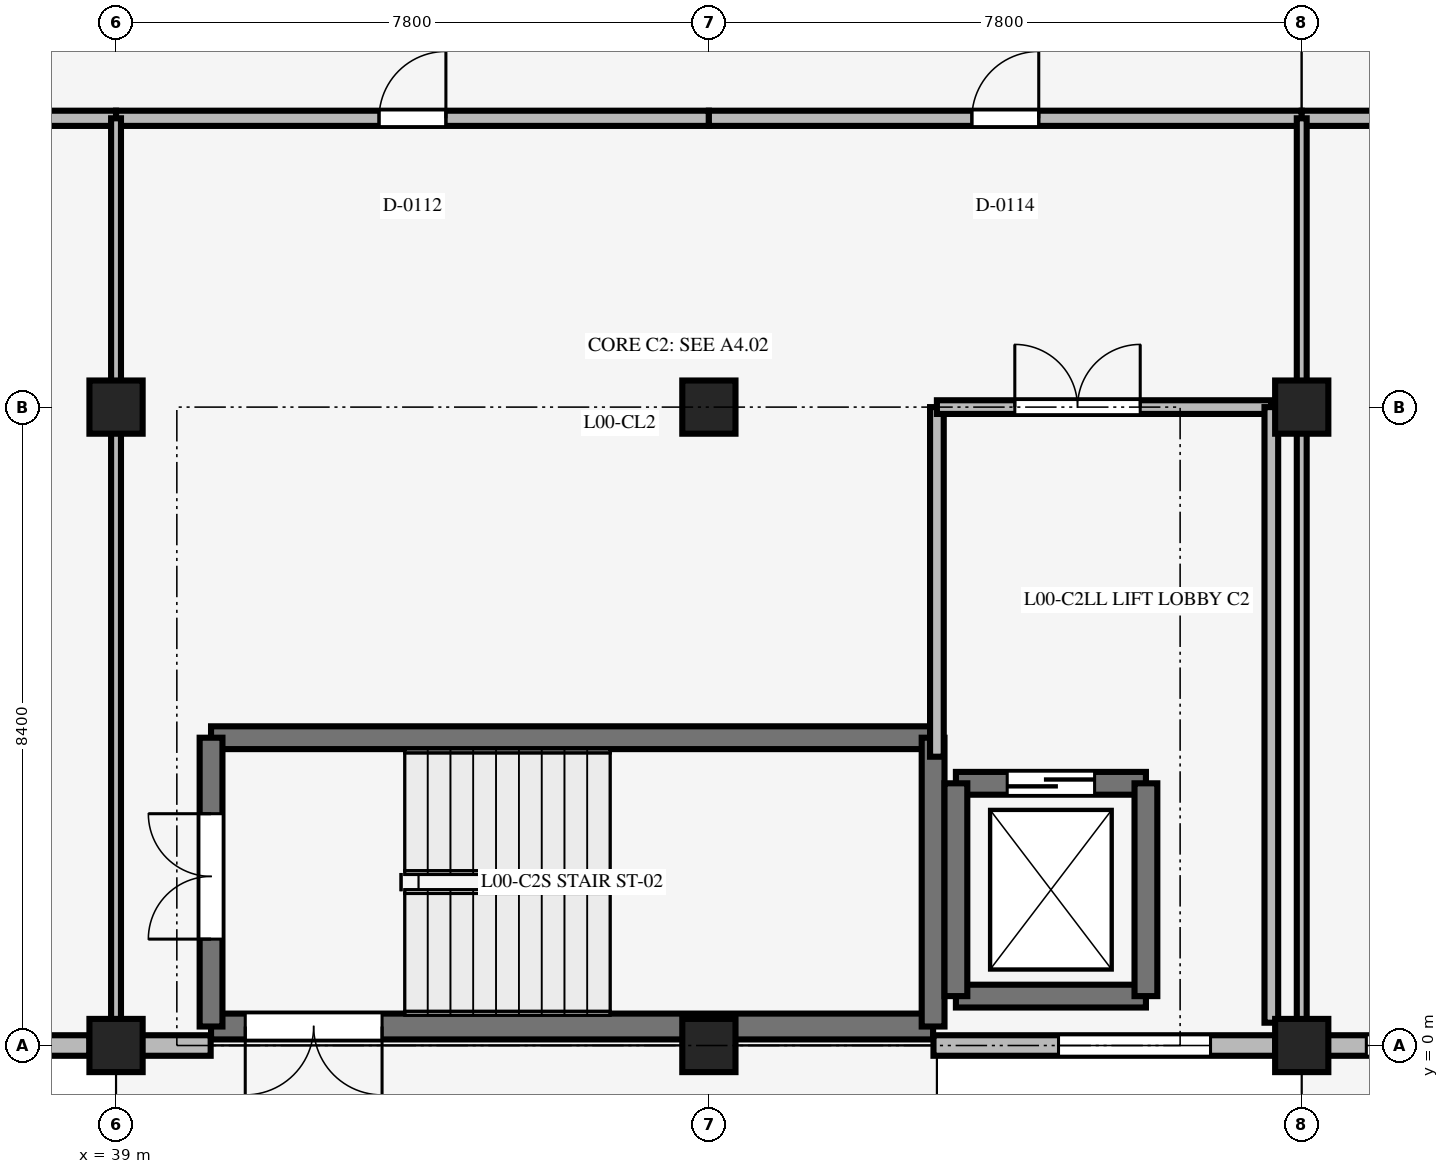
"""IFC4 building model, lengths in metres.
Left out: names, types, materials, properties, quantities, classifications, styles, units other than length and angle.
Written with IfcOpenShell. Run it as: python <this file> out.ifc"""

import sys

from ifc_helpers import new_model, si_unit, direction, frame, frame_2d, origin, origin_2d, place, context, subcontext, project, spatial, rectangle, extrude, element, fill, save


model = new_model("IFC4")
c1 = context("Model", 3, precision=1e-05, world=origin(), true_north=direction((0.0, 1.0)))
c2 = subcontext(c1, "Body", "Model", "MODEL_VIEW")
j1 = project(units=[si_unit("LENGTHUNIT", "METRE"), si_unit("PLANEANGLEUNIT", "RADIAN")], contexts=[c1])
p1 = place(None, origin())
s1 = spatial("IfcSite", under=j1, at=p1, CompositionType="ELEMENT")
p2 = place(p1, origin())
s2 = spatial("IfcBuilding", under=s1, at=p2, CompositionType="ELEMENT")
p3 = place(p2, origin())
s3 = spatial("IfcBuildingStorey", under=s2, at=p3, CompositionType="ELEMENT", Elevation=0.0)
for number, where, z_axis, x_axis in (
    (1, (39.0, 0.0, 0.0), (0.0, 0.0, 1.0), (1.0, 0.0, 0.0)),
    (2, (39.0, 8.4, 0.0), (0.0, 0.0, 1.0), (1.0, 0.0, 0.0)),
    (3, (46.8, 0.0, 0.0), (0.0, 0.0, 1.0), (1.0, 0.0, 0.0)),
    (4, (46.8, 8.4, 0.0), (0.0, 0.0, 1.0), (1.0, 0.0, 0.0)),
    (5, (54.6, 0.0, 0.0), (0.0, 0.0, 1.0), (1.0, 0.0, 0.0)),
    (6, (54.6, 8.4, 0.0), (0.0, 0.0, 1.0), (1.0, 0.0, 0.0)),
):
    element("IfcColumn", number, at=place(p3, frame(where, z_axis=z_axis, x_axis=x_axis)), inside=s3, PredefinedType="COLUMN", context=c2, shape_type="SweptSolid", body=[
        extrude(rectangle(XDim=0.7, YDim=0.7, at=origin_2d()), origin(), (0.0, 0.0, 1.0), 6.0),
    ])
p4 = place(p3, frame((49.75, 0.25, 0.0), z_axis=(0.0, 0.0, 1.0), x_axis=(-1.0, 0.0, 0.0)))
e7 = element("IfcWall", 7, at=p4, inside=s3, PredefinedType="STANDARD", context=c2, shape_type="SweptSolid", body=[
    extrude(rectangle(XDim=9.5, YDim=0.34, at=frame_2d((4.75, 0.0))), origin(), (0.0, 0.0, 1.0), 6.0),
])
p5 = place(p4, frame((7.25, 0.0, 0.0)))
e8 = element("IfcOpeningElement", 8, at=p5, cuts=e7, PredefinedType="OPENING", context=c2, shape_type="SweptSolid", body=[
    extrude(rectangle(XDim=1.8, YDim=2.25, at=frame_2d((0.9, 1.125))), frame((0.0, 0.18, 0.0), z_axis=(0.0, -1.0, 0.0), x_axis=(1.0, 0.0, 0.0)), (0.0, 0.0, 1.0), 0.36),
])
p6 = place(p3, frame((40.25, 4.05, 0.0), z_axis=(0.0, 0.0, 1.0), x_axis=(1.0, 0.0, 0.0)))
e9 = element("IfcWall", 9, at=p6, inside=s3, PredefinedType="SHEAR", context=c2, shape_type="SweptSolid", body=[
    extrude(rectangle(XDim=9.5, YDim=0.3, at=frame_2d((4.75, 0.0))), origin(), (0.0, 0.0, 1.0), 6.0),
])
p7 = place(p3, frame((40.25, 0.25, 0.0), z_axis=(0.0, 0.0, 1.0), x_axis=(0.0, 1.0, 0.0)))
e10 = element("IfcWall", 10, at=p7, inside=s3, PredefinedType="SHEAR", context=c2, shape_type="SweptSolid", body=[
    extrude(rectangle(XDim=3.8, YDim=0.3, at=frame_2d((1.9, 0.0))), origin(), (0.0, 0.0, 1.0), 6.0),
])
p8 = place(p7, frame((1.15, 0.0, 0.0)))
e11 = element("IfcOpeningElement", 11, at=p8, cuts=e10, PredefinedType="OPENING", context=c2, shape_type="SweptSolid", body=[
    extrude(rectangle(XDim=1.65, YDim=2.2, at=frame_2d((0.825, 1.1))), frame((0.0, 0.16, 0.0), z_axis=(0.0, -1.0, 0.0), x_axis=(1.0, 0.0, 0.0)), (0.0, 0.0, 1.0), 0.32),
])
p9 = place(p3, frame((49.75, 0.25, 0.0), z_axis=(0.0, 0.0, 1.0), x_axis=(0.0, 1.0, 0.0)))
e12 = element("IfcWall", 12, at=p9, inside=s3, PredefinedType="SHEAR", context=c2, shape_type="SweptSolid", body=[
    extrude(rectangle(XDim=3.8, YDim=0.3, at=frame_2d((1.9, 0.0))), origin(), (0.0, 0.0, 1.0), 6.0),
])
p10 = place(p3, frame((50.05, 0.65, 0.0), z_axis=(0.0, 0.0, 1.0), x_axis=(1.0, 0.0, 0.0)))
e13 = element("IfcWall", 13, at=p10, inside=s3, PredefinedType="SHEAR", context=c2, shape_type="SweptSolid", body=[
    extrude(rectangle(XDim=2.5, YDim=0.3, at=frame_2d((1.25, 0.0))), origin(), (0.0, 0.0, 1.0), 5.66),
])
p11 = place(p3, frame((50.05, 3.45, 0.0), z_axis=(0.0, 0.0, 1.0), x_axis=(1.0, 0.0, 0.0)))
e14 = element("IfcWall", 14, at=p11, inside=s3, PredefinedType="SHEAR", context=c2, shape_type="SweptSolid", body=[
    extrude(rectangle(XDim=2.5, YDim=0.3, at=frame_2d((1.25, 0.0))), origin(), (0.0, 0.0, 1.0), 5.66),
])
p12 = place(p11, frame((0.675, 0.0, 0.0)))
e15 = element("IfcOpeningElement", 15, at=p12, cuts=e14, PredefinedType="OPENING", context=c2, shape_type="SweptSolid", body=[
    extrude(rectangle(XDim=1.15, YDim=2.2, at=frame_2d((0.575, 1.1))), frame((0.0, 0.16, 0.0), z_axis=(0.0, -1.0, 0.0), x_axis=(1.0, 0.0, 0.0)), (0.0, 0.0, 1.0), 0.32),
])
for number, where, z_axis, x_axis in (
    (16, (50.05, 0.65, 0.0), (0.0, 0.0, 1.0), (0.0, 1.0, 0.0)),
    (17, (52.55, 0.65, 0.0), (0.0, 0.0, 1.0), (0.0, 1.0, 0.0)),
):
    element("IfcWall", number, at=place(p3, frame(where, z_axis=z_axis, x_axis=x_axis)), inside=s3, PredefinedType="SHEAR", context=c2, shape_type="SweptSolid", body=[
        extrude(rectangle(XDim=2.8, YDim=0.3, at=frame_2d((1.4, 0.0))), origin(), (0.0, 0.0, 1.0), 5.66),
    ])
p13 = place(p3, frame((38.65, 0.0, 0.0), z_axis=(0.0, 0.0, 1.0), x_axis=(-1.0, 0.0, 0.0)))
e18 = element("IfcWall", 18, at=p13, inside=s3, PredefinedType="STANDARD", context=c2, shape_type="SweptSolid", body=[
    extrude(rectangle(XDim=7.1, YDim=0.27, at=frame_2d((3.55, 0.0))), origin(), (0.0, 0.0, 1.0), 5.381),
])
p14 = place(p13, frame((0.9, 0.0, 0.9)))
e19 = element("IfcOpeningElement", 19, at=p14, cuts=e18, PredefinedType="OPENING", context=c2, shape_type="SweptSolid", body=[
    extrude(rectangle(XDim=3.2, YDim=2.1, at=frame_2d((1.6, 1.05))), frame((0.0, 0.145, 0.0), z_axis=(0.0, -1.0, 0.0), x_axis=(1.0, 0.0, 0.0)), (0.0, 0.0, 1.0), 0.29),
])
p15 = place(p3, frame((40.245, 0.0, 0.0), z_axis=(0.0, 0.0, 1.0), x_axis=(-1.0, 0.0, 0.0)))
e20 = element("IfcWall", 20, at=p15, inside=s3, PredefinedType="STANDARD", context=c2, shape_type="SweptSolid", body=[
    extrude(rectangle(XDim=0.925, YDim=0.27, at=frame_2d((0.462, 0.0))), origin(), (0.0, 0.0, 1.0), 5.75),
])
p16 = place(p3, frame((54.25, 0.0, 0.0), z_axis=(0.0, 0.0, 1.0), x_axis=(-1.0, 0.0, 0.0)))
e21 = element("IfcWall", 21, at=p16, inside=s3, PredefinedType="STANDARD", context=c2, shape_type="SweptSolid", body=[
    extrude(rectangle(XDim=4.495, YDim=0.27, at=frame_2d((2.248, 0.0))), origin(), (0.0, 0.0, 1.0), 5.75),
])
p17 = place(p16, frame((0.85, 0.0, 1.2)))
e22 = element("IfcOpeningElement", 22, at=p17, cuts=e21, PredefinedType="OPENING", context=c2, shape_type="SweptSolid", body=[
    extrude(rectangle(XDim=2.0, YDim=0.9, at=frame_2d((1.0, 0.45))), frame((0.0, 0.145, 0.0), z_axis=(0.0, -1.0, 0.0), x_axis=(1.0, 0.0, 0.0)), (0.0, 0.0, 1.0), 0.29),
])
p18 = place(p3, frame((57.445, 0.0, 0.0), z_axis=(0.0, 0.0, 1.0), x_axis=(-1.0, 0.0, 0.0)))
e23 = element("IfcWall", 23, at=p18, inside=s3, PredefinedType="STANDARD", context=c2, shape_type="SweptSolid", body=[
    extrude(rectangle(XDim=2.525, YDim=0.27, at=frame_2d((1.263, 0.0))), origin(), (0.0, 0.0, 1.0), 5.75),
])
p19 = place(p18, frame((0.495, 0.0, 0.95)))
e24 = element("IfcOpeningElement", 24, at=p19, cuts=e23, PredefinedType="OPENING", context=c2, shape_type="SweptSolid", body=[
    extrude(rectangle(XDim=1.5, YDim=1.6, at=frame_2d((0.75, 0.8))), frame((0.0, 0.145, 0.0), z_axis=(0.0, -1.0, 0.0), x_axis=(1.0, 0.0, 0.0)), (0.0, 0.0, 1.0), 0.29),
])
p20 = place(p3, frame((31.2, 12.2, 0.0), z_axis=(0.0, 0.0, 1.0), x_axis=(1.0, 0.0, 0.0)))
e25 = element("IfcWall", 25, at=p20, inside=s3, PredefinedType="STANDARD", context=c2, shape_type="SweptSolid", body=[
    extrude(rectangle(XDim=7.8, YDim=0.2, at=frame_2d((3.9, 0.0))), origin(), (0.0, 0.0, 1.0), 3.05),
])
p21 = place(p20, frame((3.46, 0.0, 0.0)))
e26 = element("IfcOpeningElement", 26, at=p21, cuts=e25, PredefinedType="OPENING", context=c2, shape_type="SweptSolid", body=[
    extrude(rectangle(XDim=0.88, YDim=2.1, at=frame_2d((0.44, 1.05))), frame((0.0, 0.11, 0.0), z_axis=(0.0, -1.0, 0.0), x_axis=(1.0, 0.0, 0.0)), (0.0, 0.0, 1.0), 0.22),
])
p22 = place(p3, frame((39.0, 12.2, 0.0), z_axis=(0.0, 0.0, 1.0), x_axis=(1.0, 0.0, 0.0)))
e27 = element("IfcWall", 27, at=p22, inside=s3, PredefinedType="STANDARD", context=c2, shape_type="SweptSolid", body=[
    extrude(rectangle(XDim=7.8, YDim=0.2, at=frame_2d((3.9, 0.0))), origin(), (0.0, 0.0, 1.0), 3.05),
])
p23 = place(p22, frame((3.46, 0.0, 0.0)))
e28 = element("IfcOpeningElement", 28, at=p23, cuts=e27, PredefinedType="OPENING", context=c2, shape_type="SweptSolid", body=[
    extrude(rectangle(XDim=0.88, YDim=2.1, at=frame_2d((0.44, 1.05))), frame((0.0, 0.11, 0.0), z_axis=(0.0, -1.0, 0.0), x_axis=(1.0, 0.0, 0.0)), (0.0, 0.0, 1.0), 0.22),
])
p24 = place(p3, frame((46.8, 12.2, 0.0), z_axis=(0.0, 0.0, 1.0), x_axis=(1.0, 0.0, 0.0)))
e29 = element("IfcWall", 29, at=p24, inside=s3, PredefinedType="STANDARD", context=c2, shape_type="SweptSolid", body=[
    extrude(rectangle(XDim=7.8, YDim=0.2, at=frame_2d((3.9, 0.0))), origin(), (0.0, 0.0, 1.0), 3.05),
])
p25 = place(p24, frame((3.46, 0.0, 0.0)))
e30 = element("IfcOpeningElement", 30, at=p25, cuts=e29, PredefinedType="OPENING", context=c2, shape_type="SweptSolid", body=[
    extrude(rectangle(XDim=0.88, YDim=2.1, at=frame_2d((0.44, 1.05))), frame((0.0, 0.11, 0.0), z_axis=(0.0, -1.0, 0.0), x_axis=(1.0, 0.0, 0.0)), (0.0, 0.0, 1.0), 0.22),
])
p26 = place(p3, frame((54.6, 12.2, 0.0), z_axis=(0.0, 0.0, 1.0), x_axis=(1.0, 0.0, 0.0)))
e31 = element("IfcWall", 31, at=p26, inside=s3, PredefinedType="STANDARD", context=c2, shape_type="SweptSolid", body=[
    extrude(rectangle(XDim=8.4, YDim=0.2, at=frame_2d((4.2, 0.0))), origin(), (0.0, 0.0, 1.0), 3.05),
])
p27 = place(p26, frame((3.76, 0.0, 0.0)))
e32 = element("IfcOpeningElement", 32, at=p27, cuts=e31, PredefinedType="OPENING", context=c2, shape_type="SweptSolid", body=[
    extrude(rectangle(XDim=0.88, YDim=2.1, at=frame_2d((0.44, 1.05))), frame((0.0, 0.11, 0.0), z_axis=(0.0, -1.0, 0.0), x_axis=(1.0, 0.0, 0.0)), (0.0, 0.0, 1.0), 0.22),
])
p28 = place(p3, frame((39.0, 0.3, 0.0), z_axis=(0.0, 0.0, 1.0), x_axis=(0.0, 1.0, 0.0)))
e33 = element("IfcWall", 33, at=p28, inside=s3, PredefinedType="STANDARD", context=c2, shape_type="SweptSolid", body=[
    extrude(rectangle(XDim=7.8, YDim=0.13, at=frame_2d((3.9, 0.0))), origin(), (0.0, 0.0, 1.0), 3.05),
])
p29 = place(p3, frame((39.0, 8.7, 0.0), z_axis=(0.0, 0.0, 1.0), x_axis=(0.0, 1.0, 0.0)))
e34 = element("IfcWall", 34, at=p29, inside=s3, PredefinedType="STANDARD", context=c2, shape_type="SweptSolid", body=[
    extrude(rectangle(XDim=3.5, YDim=0.13, at=frame_2d((1.75, 0.0))), origin(), (0.0, 0.0, 1.0), 3.05),
])
p30 = place(p3, frame((54.6, 0.3, 0.0), z_axis=(0.0, 0.0, 1.0), x_axis=(0.0, 1.0, 0.0)))
e35 = element("IfcWall", 35, at=p30, inside=s3, PredefinedType="STANDARD", context=c2, shape_type="SweptSolid", body=[
    extrude(rectangle(XDim=7.8, YDim=0.13, at=frame_2d((3.9, 0.0))), origin(), (0.0, 0.0, 1.0), 3.05),
])
p31 = place(p3, frame((54.6, 8.7, 0.0), z_axis=(0.0, 0.0, 1.0), x_axis=(0.0, 1.0, 0.0)))
e36 = element("IfcWall", 36, at=p31, inside=s3, PredefinedType="STANDARD", context=c2, shape_type="SweptSolid", body=[
    extrude(rectangle(XDim=3.5, YDim=0.13, at=frame_2d((1.75, 0.0))), origin(), (0.0, 0.0, 1.0), 3.05),
])
p32 = place(p3, frame((49.8, 3.8, 0.0), z_axis=(0.0, 0.0, 1.0), x_axis=(0.0, 1.0, 0.0)))
e37 = element("IfcWall", 37, at=p32, inside=s3, PredefinedType="STANDARD", context=c2, shape_type="SweptSolid", body=[
    extrude(rectangle(XDim=4.6, YDim=0.18, at=frame_2d((2.3, 0.0))), origin(), (0.0, 0.0, 1.0), 3.05),
])
p33 = place(p3, frame((49.8, 8.4, 0.0), z_axis=(0.0, 0.0, 1.0), x_axis=(1.0, 0.0, 0.0)))
e38 = element("IfcWall", 38, at=p33, inside=s3, PredefinedType="STANDARD", context=c2, shape_type="SweptSolid", body=[
    extrude(rectangle(XDim=4.4, YDim=0.18, at=frame_2d((2.2, 0.0))), origin(), (0.0, 0.0, 1.0), 3.05),
])
p34 = place(p33, frame((1.025, 0.0, 0.0)))
e39 = element("IfcOpeningElement", 39, at=p34, cuts=e38, PredefinedType="OPENING", context=c2, shape_type="SweptSolid", body=[
    extrude(rectangle(XDim=1.65, YDim=2.2, at=frame_2d((0.825, 1.1))), frame((0.0, 0.1, 0.0), z_axis=(0.0, -1.0, 0.0), x_axis=(1.0, 0.0, 0.0)), (0.0, 0.0, 1.0), 0.2),
])
p35 = place(p3, frame((54.2, 0.3, 0.0), z_axis=(0.0, 0.0, 1.0), x_axis=(0.0, 1.0, 0.0)))
e40 = element("IfcWall", 40, at=p35, inside=s3, PredefinedType="STANDARD", context=c2, shape_type="SweptSolid", body=[
    extrude(rectangle(XDim=8.1, YDim=0.18, at=frame_2d((4.05, 0.0))), origin(), (0.0, 0.0, 1.0), 3.05),
])
p36 = place(p17, origin())
e41 = element("IfcWindow", 41, at=p36, inside=s3, PartitioningType="SINGLE_PANEL", PredefinedType="WINDOW", context=c2, shape_type="SweptSolid", body=[
    extrude(rectangle(XDim=2.0, YDim=0.9, at=frame_2d((1.0, 0.45))), frame((0.0, 0.03, 0.0), z_axis=(0.0, -1.0, 0.0), x_axis=(1.0, 0.0, 0.0)), (0.0, 0.0, 1.0), 0.06),
])
fill(e22, e41)
p37 = place(p19, origin())
e42 = element("IfcWindow", 42, at=p37, inside=s3, PartitioningType="SINGLE_PANEL", PredefinedType="WINDOW", context=c2, shape_type="SweptSolid", body=[
    extrude(rectangle(XDim=1.5, YDim=1.6, at=frame_2d((0.75, 0.8))), frame((0.0, 0.03, 0.0), z_axis=(0.0, -1.0, 0.0), x_axis=(1.0, 0.0, 0.0)), (0.0, 0.0, 1.0), 0.06),
])
fill(e24, e42)
p38 = place(p8, origin())
e43 = element("IfcDoor", 43, at=p38, inside=s3, OperationType="DOUBLE_DOOR_SINGLE_SWING", PredefinedType="DOOR", context=c2, shape_type="SweptSolid", body=[
    extrude(rectangle(XDim=1.65, YDim=2.2, at=frame_2d((0.825, 1.1))), frame((0.0, 0.025, 0.0), z_axis=(0.0, -1.0, 0.0), x_axis=(1.0, 0.0, 0.0)), (0.0, 0.0, 1.0), 0.05),
])
fill(e11, e43)
p39 = place(p5, origin())
e44 = element("IfcDoor", 44, at=p39, inside=s3, OperationType="DOUBLE_DOOR_SINGLE_SWING", PredefinedType="DOOR", context=c2, shape_type="SweptSolid", body=[
    extrude(rectangle(XDim=1.8, YDim=2.25, at=frame_2d((0.9, 1.125))), frame((0.0, 0.025, 0.0), z_axis=(0.0, -1.0, 0.0), x_axis=(1.0, 0.0, 0.0)), (0.0, 0.0, 1.0), 0.05),
])
fill(e8, e44)
p40 = place(p12, origin())
e45 = element("IfcDoor", 45, at=p40, inside=s3, OperationType="DOUBLE_DOOR_SLIDING", PredefinedType="DOOR", context=c2, shape_type="SweptSolid", body=[
    extrude(rectangle(XDim=1.15, YDim=2.2, at=frame_2d((0.575, 1.1))), frame((0.0, 0.025, 0.0), z_axis=(0.0, -1.0, 0.0), x_axis=(1.0, 0.0, 0.0)), (0.0, 0.0, 1.0), 0.05),
])
fill(e15, e45)
p41 = place(p23, origin())
e46 = element("IfcDoor", 46, at=p41, inside=s3, OperationType="SINGLE_SWING_RIGHT", PredefinedType="DOOR", context=c2, shape_type="SweptSolid", body=[
    extrude(rectangle(XDim=0.88, YDim=2.1, at=frame_2d((0.44, 1.05))), frame((0.0, 0.025, 0.0), z_axis=(0.0, -1.0, 0.0), x_axis=(1.0, 0.0, 0.0)), (0.0, 0.0, 1.0), 0.05),
])
fill(e28, e46)
p42 = place(p25, origin())
e47 = element("IfcDoor", 47, at=p42, inside=s3, OperationType="SINGLE_SWING_RIGHT", PredefinedType="DOOR", context=c2, shape_type="SweptSolid", body=[
    extrude(rectangle(XDim=0.88, YDim=2.1, at=frame_2d((0.44, 1.05))), frame((0.0, 0.025, 0.0), z_axis=(0.0, -1.0, 0.0), x_axis=(1.0, 0.0, 0.0)), (0.0, 0.0, 1.0), 0.05),
])
fill(e30, e47)
p43 = place(p34, origin())
e48 = element("IfcDoor", 48, at=p43, inside=s3, OperationType="DOUBLE_DOOR_SINGLE_SWING", PredefinedType="DOOR", context=c2, shape_type="SweptSolid", body=[
    extrude(rectangle(XDim=1.65, YDim=2.2, at=frame_2d((0.825, 1.1))), frame((0.0, 0.025, 0.0), z_axis=(0.0, -1.0, 0.0), x_axis=(1.0, 0.0, 0.0)), (0.0, 0.0, 1.0), 0.05),
])
fill(e39, e48)
save(model, sys.argv[1])
